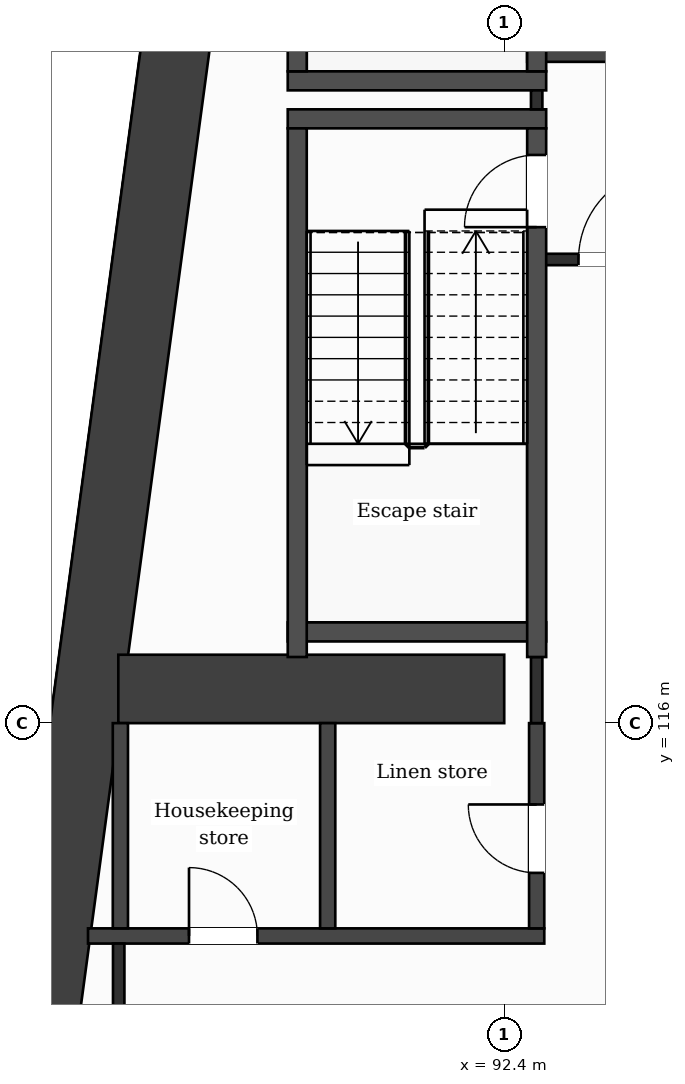
"""IFC4 building model, lengths in metres.
Left out: names, types, materials, properties, quantities, classifications, styles, units other than length and angle.
Written with IfcOpenShell. Run it as: python <this file> out.ifc"""

import sys

from ifc_helpers import new_model, si_unit, direction, frame, frame_2d, origin, place, context, subcontext, project, spatial, rectangle, extrude, element, fill, save


model = new_model("IFC4")
c1 = context("Model", 3, precision=1e-05, world=origin(), true_north=direction((0.0, 1.0)))
c2 = subcontext(c1, "Body", "Model", "MODEL_VIEW")
j1 = project(units=[si_unit("LENGTHUNIT", "METRE"), si_unit("PLANEANGLEUNIT", "RADIAN")], contexts=[c1])
p1 = place(None, origin())
s1 = spatial("IfcSite", under=j1, at=p1, CompositionType="ELEMENT")
p2 = place(p1, origin())
s2 = spatial("IfcBuilding", under=s1, at=p2, CompositionType="ELEMENT")
p3 = place(p2, frame((0.0, 0.0, 181.1)))
s3 = spatial("IfcBuildingStorey", under=s2, at=p3, CompositionType="ELEMENT", Elevation=181.1)
p4 = place(p3, frame((86.184, 110.85, 0.0), z_axis=(0.0, 0.0, 1.0), x_axis=(0.133410495943, 0.991060865725, 0.0)))
e1 = element("IfcWall", 1, at=p4, inside=s3, PredefinedType="SHEAR", context=c2, shape_type="SweptSolid", body=[
    extrude(rectangle(XDim=21.29, YDim=0.9, at=frame_2d((10.645, 0.0))), origin(), (0.0, 0.0, 1.0), 3.7),
])
p5 = place(p3, frame((87.323, 116.45, 0.0), z_axis=(0.0, 0.0, 1.0), x_axis=(1.0, 0.0, 0.0)))
e2 = element("IfcWall", 2, at=p5, inside=s3, PredefinedType="SHEAR", context=c2, shape_type="SweptSolid", body=[
    extrude(rectangle(XDim=5.077, YDim=0.9, at=frame_2d((2.539, 0.0))), origin(), (0.0, 0.0, 1.0), 3.7),
])
p6 = place(p3, frame((86.924, 113.2, 0.0), z_axis=(0.0, 0.0, 1.0), x_axis=(1.0, 0.0, 0.0)))
e3 = element("IfcWall", 3, at=p6, inside=s3, PredefinedType="PARTITIONING", context=c2, shape_type="SweptSolid", body=[
    extrude(rectangle(XDim=6.003, YDim=0.2, at=frame_2d((3.001, 0.0))), origin(), (0.0, 0.0, 1.0), 3.38),
])
p7 = place(p6, frame((1.329, 0.0, 0.0)))
e4 = element("IfcOpeningElement", 4, at=p7, cuts=e3, PredefinedType="OPENING", context=c2, shape_type="SweptSolid", body=[
    extrude(rectangle(XDim=0.9, YDim=2.1, at=frame_2d((0.45, 1.05))), frame((0.0, 0.11, 0.0), z_axis=(0.0, -1.0, 0.0), x_axis=(1.0, 0.0, 0.0)), (0.0, 0.0, 1.0), 0.22),
])
p8 = place(p3, frame((89.552, 117.2, 0.0), z_axis=(0.0, 0.0, 1.0), x_axis=(1.0, 0.0, 0.0)))
e5 = element("IfcWall", 5, at=p8, inside=s3, PredefinedType="PARTITIONING", context=c2, shape_type="SweptSolid", body=[
    extrude(rectangle(XDim=3.4, YDim=0.25, at=frame_2d((1.7, 0.0))), origin(), (0.0, 0.0, 1.0), 3.38),
])
p9 = place(p3, frame((92.827, 122.1, 0.0), z_axis=(0.0, 0.0, 1.0), x_axis=(1.0, 0.0, 0.0)))
e6 = element("IfcWall", 6, at=p9, inside=s3, PredefinedType="PARTITIONING", context=c2, shape_type="SweptSolid", body=[
    extrude(rectangle(XDim=2.4, YDim=0.15, at=frame_2d((1.2, 0.0))), origin(), (0.0, 0.0, 1.0), 3.38),
])
p10 = place(p9, frame((0.55, 0.0, 0.0)))
e7 = element("IfcOpeningElement", 7, at=p10, cuts=e6, PredefinedType="OPENING", context=c2, shape_type="SweptSolid", body=[
    extrude(rectangle(XDim=1.2, YDim=2.1, at=frame_2d((0.6, 1.05))), frame((0.0, 0.085, 0.0), z_axis=(0.0, -1.0, 0.0), x_axis=(1.0, 0.0, 0.0)), (0.0, 0.0, 1.0), 0.17),
])
for number, where, z_axis, x_axis in (
    (8, (89.552, 123.95, 0.0), (0.0, 0.0, 1.0), (1.0, 0.0, 0.0)),
    (9, (89.552, 124.45, 0.0), (0.0, 0.0, 1.0), (1.0, 0.0, 0.0)),
):
    element("IfcWall", number, at=place(p3, frame(where, z_axis=z_axis, x_axis=x_axis)), inside=s3, PredefinedType="PARTITIONING", context=c2, shape_type="SweptSolid", body=[
        extrude(rectangle(XDim=3.4, YDim=0.25, at=frame_2d((1.7, 0.0))), origin(), (0.0, 0.0, 1.0), 3.38),
    ])
p11 = place(p3, frame((92.702, 124.8, 0.0), z_axis=(0.0, 0.0, 1.0), x_axis=(1.0, 0.0, 0.0)))
e10 = element("IfcWall", 10, at=p11, inside=s3, PredefinedType="PARTITIONING", context=c2, shape_type="SweptSolid", body=[
    extrude(rectangle(XDim=7.198, YDim=0.2, at=frame_2d((3.599, 0.0))), origin(), (0.0, 0.0, 1.0), 3.38),
])
p12 = place(p11, frame((5.469, 0.0, 0.0)))
e11 = element("IfcOpeningElement", 11, at=p12, cuts=e10, PredefinedType="OPENING", context=c2, shape_type="SweptSolid", body=[
    extrude(rectangle(XDim=1.1, YDim=2.1, at=frame_2d((0.55, 1.05))), frame((0.0, 0.11, 0.0), z_axis=(0.0, -1.0, 0.0), x_axis=(1.0, 0.0, 0.0)), (0.0, 0.0, 1.0), 0.22),
])
p13 = place(p3, frame((87.35, 113.3, 0.0), z_axis=(0.0, 0.0, 1.0), x_axis=(0.0, 1.0, 0.0)))
e12 = element("IfcWall", 12, at=p13, inside=s3, PredefinedType="PARTITIONING", context=c2, shape_type="SweptSolid", body=[
    extrude(rectangle(XDim=2.7, YDim=0.2, at=frame_2d((1.35, 0.0))), origin(), (0.0, 0.0, 1.0), 3.38),
])
p14 = place(p3, frame((87.328, 111.3, 0.0), z_axis=(0.0, 0.0, 1.0), x_axis=(0.0, 1.0, 0.0)))
e13 = element("IfcWall", 13, at=p14, inside=s3, PredefinedType="PARTITIONING", context=c2, shape_type="SweptSolid", body=[
    extrude(rectangle(XDim=1.8, YDim=0.15, at=frame_2d((0.9, 0.0))), origin(), (0.0, 0.0, 1.0), 3.38),
])
p15 = place(p3, frame((89.677, 116.87, 0.0), z_axis=(0.0, 0.0, 1.0), x_axis=(0.0, 1.0, 0.0)))
e14 = element("IfcWall", 14, at=p15, inside=s3, PredefinedType="PARTITIONING", context=c2, shape_type="SweptSolid", body=[
    extrude(rectangle(XDim=6.955, YDim=0.25, at=frame_2d((3.478, 0.0))), origin(), (0.0, 0.0, 1.0), 3.38),
])
p16 = place(p3, frame((89.677, 124.575, 0.0), z_axis=(0.0, 0.0, 1.0), x_axis=(0.0, 1.0, 0.0)))
e15 = element("IfcWall", 15, at=p16, inside=s3, PredefinedType="PARTITIONING", context=c2, shape_type="SweptSolid", body=[
    extrude(rectangle(XDim=6.955, YDim=0.25, at=frame_2d((3.478, 0.0))), origin(), (0.0, 0.0, 1.0), 3.38),
])
p17 = place(p3, frame((90.077, 113.3, 0.0), z_axis=(0.0, 0.0, 1.0), x_axis=(0.0, 1.0, 0.0)))
e16 = element("IfcWall", 16, at=p17, inside=s3, PredefinedType="PARTITIONING", context=c2, shape_type="SweptSolid", body=[
    extrude(rectangle(XDim=2.7, YDim=0.2, at=frame_2d((1.35, 0.0))), origin(), (0.0, 0.0, 1.0), 3.38),
])
p18 = place(p3, frame((92.827, 113.3, 0.0), z_axis=(0.0, 0.0, 1.0), x_axis=(0.0, 1.0, 0.0)))
e17 = element("IfcWall", 17, at=p18, inside=s3, PredefinedType="PARTITIONING", context=c2, shape_type="SweptSolid", body=[
    extrude(rectangle(XDim=2.7, YDim=0.2, at=frame_2d((1.35, 0.0))), origin(), (0.0, 0.0, 1.0), 3.38),
])
p19 = place(p18, frame((0.73, 0.0, 0.0)))
e18 = element("IfcOpeningElement", 18, at=p19, cuts=e17, PredefinedType="OPENING", context=c2, shape_type="SweptSolid", body=[
    extrude(rectangle(XDim=0.9, YDim=2.1, at=frame_2d((0.45, 1.05))), frame((0.0, 0.11, 0.0), z_axis=(0.0, -1.0, 0.0), x_axis=(1.0, 0.0, 0.0)), (0.0, 0.0, 1.0), 0.22),
])
p20 = place(p3, frame((92.827, 116.0, 0.0), z_axis=(0.0, 0.0, 1.0), x_axis=(0.0, 1.0, 0.0)))
e19 = element("IfcWall", 19, at=p20, inside=s3, PredefinedType="PARTITIONING", context=c2, shape_type="SweptSolid", body=[
    extrude(rectangle(XDim=0.87, YDim=0.15, at=frame_2d((0.435, 0.0))), origin(), (0.0, 0.0, 1.0), 3.38),
])
p21 = place(p3, frame((92.827, 124.075, 0.0), z_axis=(0.0, 0.0, 1.0), x_axis=(0.0, 1.0, 0.0)))
e20 = element("IfcWall", 20, at=p21, inside=s3, PredefinedType="PARTITIONING", context=c2, shape_type="SweptSolid", body=[
    extrude(rectangle(XDim=0.25, YDim=0.15, at=frame_2d((0.125, 0.0))), origin(), (0.0, 0.0, 1.0), 3.38),
])
p22 = place(p3, frame((92.827, 116.87, 0.0), z_axis=(0.0, 0.0, 1.0), x_axis=(0.0, 1.0, 0.0)))
e21 = element("IfcWall", 21, at=p22, inside=s3, PredefinedType="PARTITIONING", context=c2, shape_type="SweptSolid", body=[
    extrude(rectangle(XDim=6.955, YDim=0.25, at=frame_2d((3.478, 0.0))), origin(), (0.0, 0.0, 1.0), 3.38),
])
p23 = place(p22, frame((5.655, 0.0, 0.0)))
e22 = element("IfcOpeningElement", 22, at=p23, cuts=e21, PredefinedType="OPENING", context=c2, shape_type="SweptSolid", body=[
    extrude(rectangle(XDim=0.95, YDim=2.1, at=frame_2d((0.475, 1.05))), frame((0.0, 0.135, 0.0), z_axis=(0.0, -1.0, 0.0), x_axis=(1.0, 0.0, 0.0)), (0.0, 0.0, 1.0), 0.27),
])
p24 = place(p3, frame((92.827, 124.575, 0.0), z_axis=(0.0, 0.0, 1.0), x_axis=(0.0, 1.0, 0.0)))
e23 = element("IfcWall", 23, at=p24, inside=s3, PredefinedType="PARTITIONING", context=c2, shape_type="SweptSolid", body=[
    extrude(rectangle(XDim=6.955, YDim=0.25, at=frame_2d((3.478, 0.0))), origin(), (0.0, 0.0, 1.0), 3.38),
])
p25 = place(p24, frame((5.325, 0.0, 0.0)))
e24 = element("IfcOpeningElement", 24, at=p25, cuts=e23, PredefinedType="OPENING", context=c2, shape_type="SweptSolid", body=[
    extrude(rectangle(XDim=1.0, YDim=2.1, at=frame_2d((0.5, 1.05))), frame((0.0, 0.135, 0.0), z_axis=(0.0, -1.0, 0.0), x_axis=(1.0, 0.0, 0.0)), (0.0, 0.0, 1.0), 0.27),
])
p26 = place(p10, origin())
e25 = element("IfcDoor", 25, at=p26, inside=s3, OperationType="SINGLE_SWING_RIGHT", PredefinedType="DOOR", context=c2, shape_type="SweptSolid", body=[
    extrude(rectangle(XDim=1.2, YDim=2.1, at=frame_2d((0.6, 1.05))), frame((0.0, 0.025, 0.0), z_axis=(0.0, -1.0, 0.0), x_axis=(1.0, 0.0, 0.0)), (0.0, 0.0, 1.0), 0.05),
])
fill(e7, e25)
p27 = place(p23, origin())
e26 = element("IfcDoor", 26, at=p27, inside=s3, OperationType="SINGLE_SWING_LEFT", PredefinedType="DOOR", context=c2, shape_type="SweptSolid", body=[
    extrude(rectangle(XDim=0.95, YDim=2.1, at=frame_2d((0.475, 1.05))), frame((0.0, 0.025, 0.0), z_axis=(0.0, -1.0, 0.0), x_axis=(1.0, 0.0, 0.0)), (0.0, 0.0, 1.0), 0.05),
])
fill(e22, e26)
p28 = place(p7, origin())
e27 = element("IfcDoor", 27, at=p28, inside=s3, OperationType="SINGLE_SWING_LEFT", PredefinedType="DOOR", context=c2, shape_type="SweptSolid", body=[
    extrude(rectangle(XDim=0.9, YDim=2.1, at=frame_2d((0.45, 1.05))), frame((0.0, 0.025, 0.0), z_axis=(0.0, -1.0, 0.0), x_axis=(1.0, 0.0, 0.0)), (0.0, 0.0, 1.0), 0.05),
])
fill(e4, e27)
p29 = place(p19, origin())
e28 = element("IfcDoor", 28, at=p29, inside=s3, OperationType="SINGLE_SWING_RIGHT", PredefinedType="DOOR", context=c2, shape_type="SweptSolid", body=[
    extrude(rectangle(XDim=0.9, YDim=2.1, at=frame_2d((0.45, 1.05))), frame((0.0, 0.025, 0.0), z_axis=(0.0, -1.0, 0.0), x_axis=(1.0, 0.0, 0.0)), (0.0, 0.0, 1.0), 0.05),
])
fill(e18, e28)
save(model, sys.argv[1])
